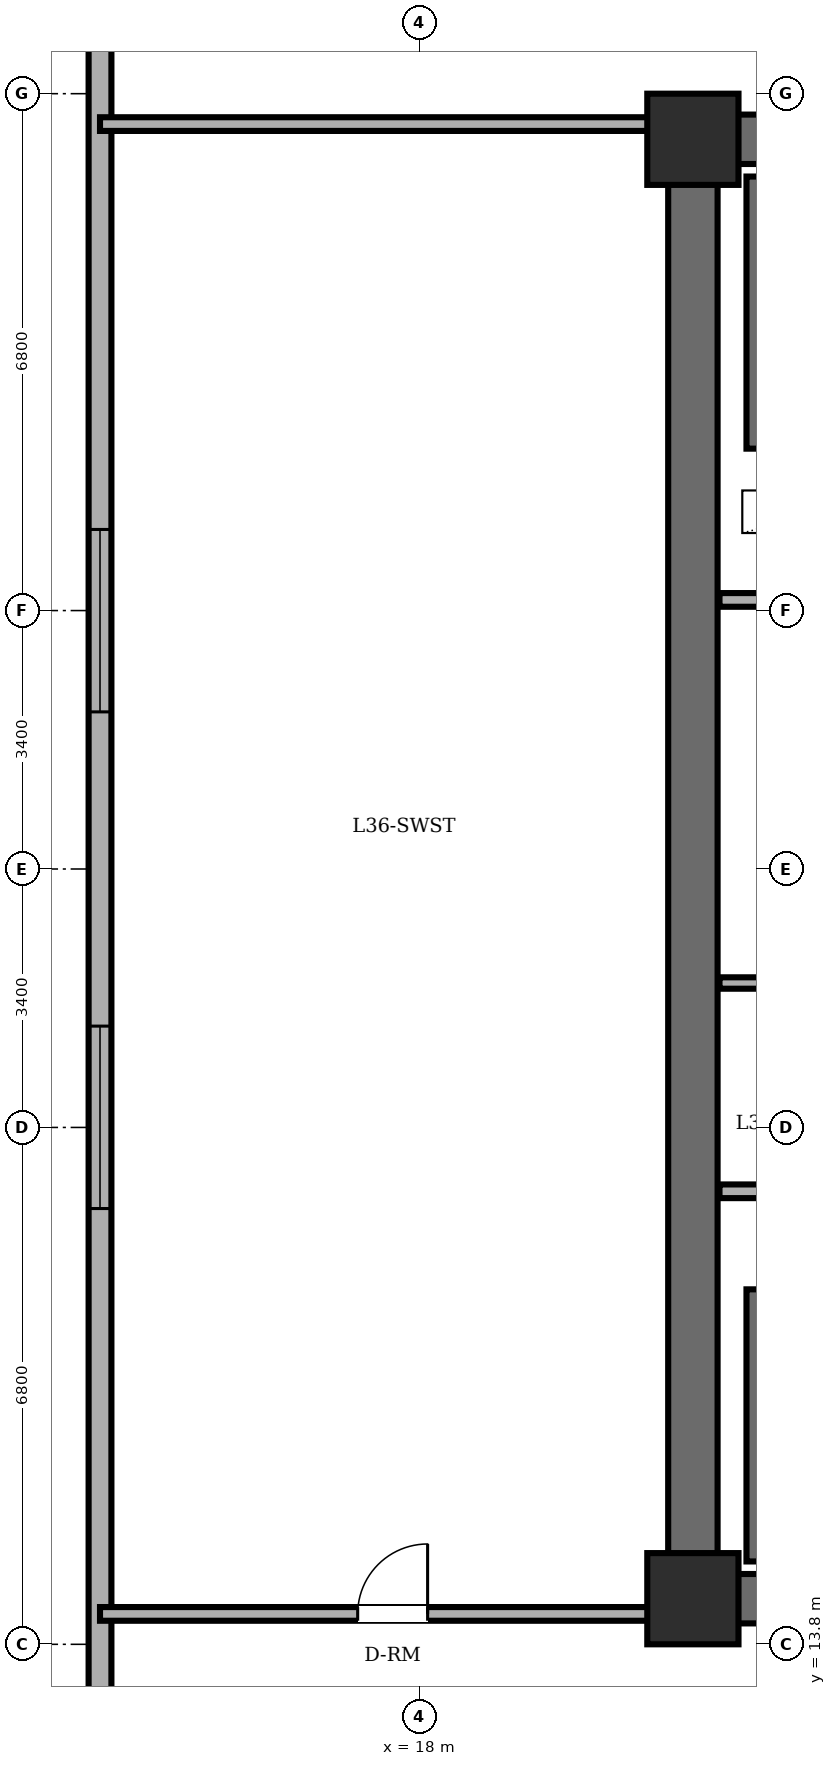
"""IFC4 building model, lengths in metres.
Left out: names, types, materials, properties, quantities, classifications, styles, units other than length and angle.
Written with IfcOpenShell. Run it as: python <this file> out.ifc"""

import sys

from ifc_helpers import new_model, si_unit, direction, frame, frame_2d, origin, origin_2d, place, context, subcontext, project, spatial, rectangle, extrude, element, fill, save


model = new_model("IFC4")
c1 = context("Model", 3, precision=1e-05, world=origin(), true_north=direction((0.0, 1.0)))
c2 = subcontext(c1, "Body", "Model", "MODEL_VIEW")
j1 = project(units=[si_unit("LENGTHUNIT", "METRE"), si_unit("PLANEANGLEUNIT", "RADIAN")], contexts=[c1])
p1 = place(None, origin())
s1 = spatial("IfcSite", under=j1, at=p1, CompositionType="ELEMENT")
p2 = place(p1, origin())
s2 = spatial("IfcBuilding", under=s1, at=p2, CompositionType="ELEMENT")
p3 = place(p2, frame((0.0, 0.0, 138.7)))
s3 = spatial("IfcBuildingStorey", under=s2, at=p3, CompositionType="ELEMENT", Elevation=138.7)
for number, where, z_axis, x_axis in (
    (1, (21.6, 14.4, 0.0), (0.0, 0.0, 1.0), (1.0, 0.0, 0.0)),
    (2, (21.6, 33.6, 0.0), (0.0, 0.0, 1.0), (1.0, 0.0, 0.0)),
):
    element("IfcColumn", number, at=place(p3, frame(where, z_axis=z_axis, x_axis=x_axis)), inside=s3, PredefinedType="COLUMN", context=c2, shape_type="SweptSolid", body=[
        extrude(rectangle(XDim=1.2, YDim=1.2, at=origin_2d()), origin(), (0.0, 0.0, 1.0), 5.1),
    ])
p4 = place(p3, frame((13.8, 36.3, 0.0), z_axis=(0.0, 0.0, 1.0), x_axis=(0.0, -1.0, 0.0)))
e3 = element("IfcWall", 3, at=p4, inside=s3, PredefinedType="SOLIDWALL", context=c2, shape_type="SweptSolid", body=[
    extrude(rectangle(XDim=24.6, YDim=0.3, at=frame_2d((12.3, 0.0))), origin(), (0.0, 0.0, 1.0), 4.9),
])
p5 = place(p4, frame((7.833, 0.0, 0.85)))
e4 = element("IfcOpeningElement", 4, at=p5, cuts=e3, PredefinedType="OPENING", context=c2, shape_type="SweptSolid", body=[
    extrude(rectangle(XDim=2.4, YDim=2.1, at=frame_2d((1.2, 1.05))), frame((0.0, 0.16, 0.0), z_axis=(0.0, -1.0, 0.0), x_axis=(1.0, 0.0, 0.0)), (0.0, 0.0, 1.0), 0.32),
])
p6 = place(p4, frame((14.367, 0.0, 0.85)))
e5 = element("IfcOpeningElement", 5, at=p6, cuts=e3, PredefinedType="OPENING", context=c2, shape_type="SweptSolid", body=[
    extrude(rectangle(XDim=2.4, YDim=2.1, at=frame_2d((1.2, 1.05))), frame((0.0, 0.16, 0.0), z_axis=(0.0, -1.0, 0.0), x_axis=(1.0, 0.0, 0.0)), (0.0, 0.0, 1.0), 0.32),
])
p7 = place(p3, frame((21.6, 14.4, 0.0), z_axis=(0.0, 0.0, 1.0), x_axis=(0.0, 1.0, 0.0)))
e6 = element("IfcWall", 6, at=p7, inside=s3, PredefinedType="SHEAR", context=c2, shape_type="SweptSolid", body=[
    extrude(rectangle(XDim=19.2, YDim=0.65, at=frame_2d((9.6, 0.0))), origin(), (0.0, 0.0, 1.0), 4.9),
])
for number, where, z_axis, x_axis in (
    (7, (21.6, 33.6, 0.0), (0.0, 0.0, 1.0), (1.0, 0.0, 0.0)),
    (8, (37.2, 14.4, 0.0), (0.0, 0.0, 1.0), (-1.0, 0.0, 0.0)),
):
    element("IfcWall", number, at=place(p3, frame(where, z_axis=z_axis, x_axis=x_axis)), inside=s3, PredefinedType="SHEAR", context=c2, shape_type="SweptSolid", body=[
        extrude(rectangle(XDim=15.6, YDim=0.65, at=frame_2d((7.8, 0.0))), origin(), (0.0, 0.0, 1.0), 4.9),
    ])
for number, where, z_axis, x_axis in (
    (9, (22.48, 29.53, 0.0), (0.0, 0.0, 1.0), (0.0, 1.0, 0.0)),
    (10, (22.48, 14.89, 0.0), (0.0, 0.0, 1.0), (0.0, 1.0, 0.0)),
):
    element("IfcWall", number, at=place(p3, frame(where, z_axis=z_axis, x_axis=x_axis)), inside=s3, PredefinedType="SOLIDWALL", context=c2, shape_type="SweptSolid", body=[
        extrude(rectangle(XDim=3.58, YDim=0.35, at=frame_2d((1.79, 0.0))), origin(), (0.0, 0.0, 1.0), 4.9),
    ])
p8 = place(p3, frame((21.95, 27.54, 0.0), z_axis=(0.0, 0.0, 1.0), x_axis=(1.0, 0.0, 0.0)))
e11 = element("IfcWall", 11, at=p8, inside=s3, PredefinedType="PARTITIONING", context=c2, shape_type="SweptSolid", body=[
    extrude(rectangle(XDim=10.56, YDim=0.18, at=frame_2d((5.28, 0.0))), origin(), (0.0, 0.0, 1.0), 4.9),
])
p9 = place(p3, frame((21.95, 19.76, 0.0), z_axis=(0.0, 0.0, 1.0), x_axis=(1.0, 0.0, 0.0)))
e12 = element("IfcWall", 12, at=p9, inside=s3, PredefinedType="PARTITIONING", context=c2, shape_type="SweptSolid", body=[
    extrude(rectangle(XDim=14.87, YDim=0.18, at=frame_2d((7.435, 0.0))), origin(), (0.0, 0.0, 1.0), 4.9),
])
p10 = place(p3, frame((21.95, 22.5, 0.0), z_axis=(0.0, 0.0, 1.0), x_axis=(1.0, 0.0, 0.0)))
e13 = element("IfcWall", 13, at=p10, inside=s3, PredefinedType="PARTITIONING", context=c2, shape_type="SweptSolid", body=[
    extrude(rectangle(XDim=2.51, YDim=0.15, at=frame_2d((1.255, 0.0))), origin(), (0.0, 0.0, 1.0), 4.9),
])
p11 = place(p3, frame((13.8, 14.2, 0.0), z_axis=(0.0, 0.0, 1.0), x_axis=(1.0, 0.0, 0.0)))
e14 = element("IfcWall", 14, at=p11, inside=s3, PredefinedType="PARTITIONING", context=c2, shape_type="SweptSolid", body=[
    extrude(rectangle(XDim=7.7, YDim=0.18, at=frame_2d((3.85, 0.0))), origin(), (0.0, 0.0, 1.0), 4.9),
])
p12 = place(p11, frame((3.39, 0.0, 0.0)))
e15 = element("IfcOpeningElement", 15, at=p12, cuts=e14, PredefinedType="OPENING", context=c2, shape_type="SweptSolid", body=[
    extrude(rectangle(XDim=0.92, YDim=2.1, at=frame_2d((0.46, 1.05))), frame((0.0, 0.1, 0.0), z_axis=(0.0, -1.0, 0.0), x_axis=(1.0, 0.0, 0.0)), (0.0, 0.0, 1.0), 0.2),
])
p13 = place(p3, frame((13.8, 33.8, 0.0), z_axis=(0.0, 0.0, 1.0), x_axis=(1.0, 0.0, 0.0)))
e16 = element("IfcWall", 16, at=p13, inside=s3, PredefinedType="PARTITIONING", context=c2, shape_type="SweptSolid", body=[
    extrude(rectangle(XDim=7.7, YDim=0.18, at=frame_2d((3.85, 0.0))), origin(), (0.0, 0.0, 1.0), 4.9),
])
p14 = place(p5, origin())
e17 = element("IfcWindow", 17, at=p14, inside=s3, PartitioningType="TRIPLE_PANEL_VERTICAL", PredefinedType="WINDOW", context=c2, shape_type="SweptSolid", body=[
    extrude(rectangle(XDim=2.4, YDim=2.1, at=frame_2d((1.2, 1.05))), frame((0.0, 0.03, 0.0), z_axis=(0.0, -1.0, 0.0), x_axis=(1.0, 0.0, 0.0)), (0.0, 0.0, 1.0), 0.06),
])
fill(e4, e17)
p15 = place(p6, origin())
e18 = element("IfcWindow", 18, at=p15, inside=s3, PartitioningType="TRIPLE_PANEL_VERTICAL", PredefinedType="WINDOW", context=c2, shape_type="SweptSolid", body=[
    extrude(rectangle(XDim=2.4, YDim=2.1, at=frame_2d((1.2, 1.05))), frame((0.0, 0.03, 0.0), z_axis=(0.0, -1.0, 0.0), x_axis=(1.0, 0.0, 0.0)), (0.0, 0.0, 1.0), 0.06),
])
fill(e5, e18)
p16 = place(p12, origin())
e19 = element("IfcDoor", 19, at=p16, inside=s3, OperationType="SINGLE_SWING_RIGHT", PredefinedType="DOOR", context=c2, shape_type="SweptSolid", body=[
    extrude(rectangle(XDim=0.92, YDim=2.1, at=frame_2d((0.46, 1.05))), frame((0.0, 0.025, 0.0), z_axis=(0.0, -1.0, 0.0), x_axis=(1.0, 0.0, 0.0)), (0.0, 0.0, 1.0), 0.05),
])
fill(e15, e19)
save(model, sys.argv[1])
